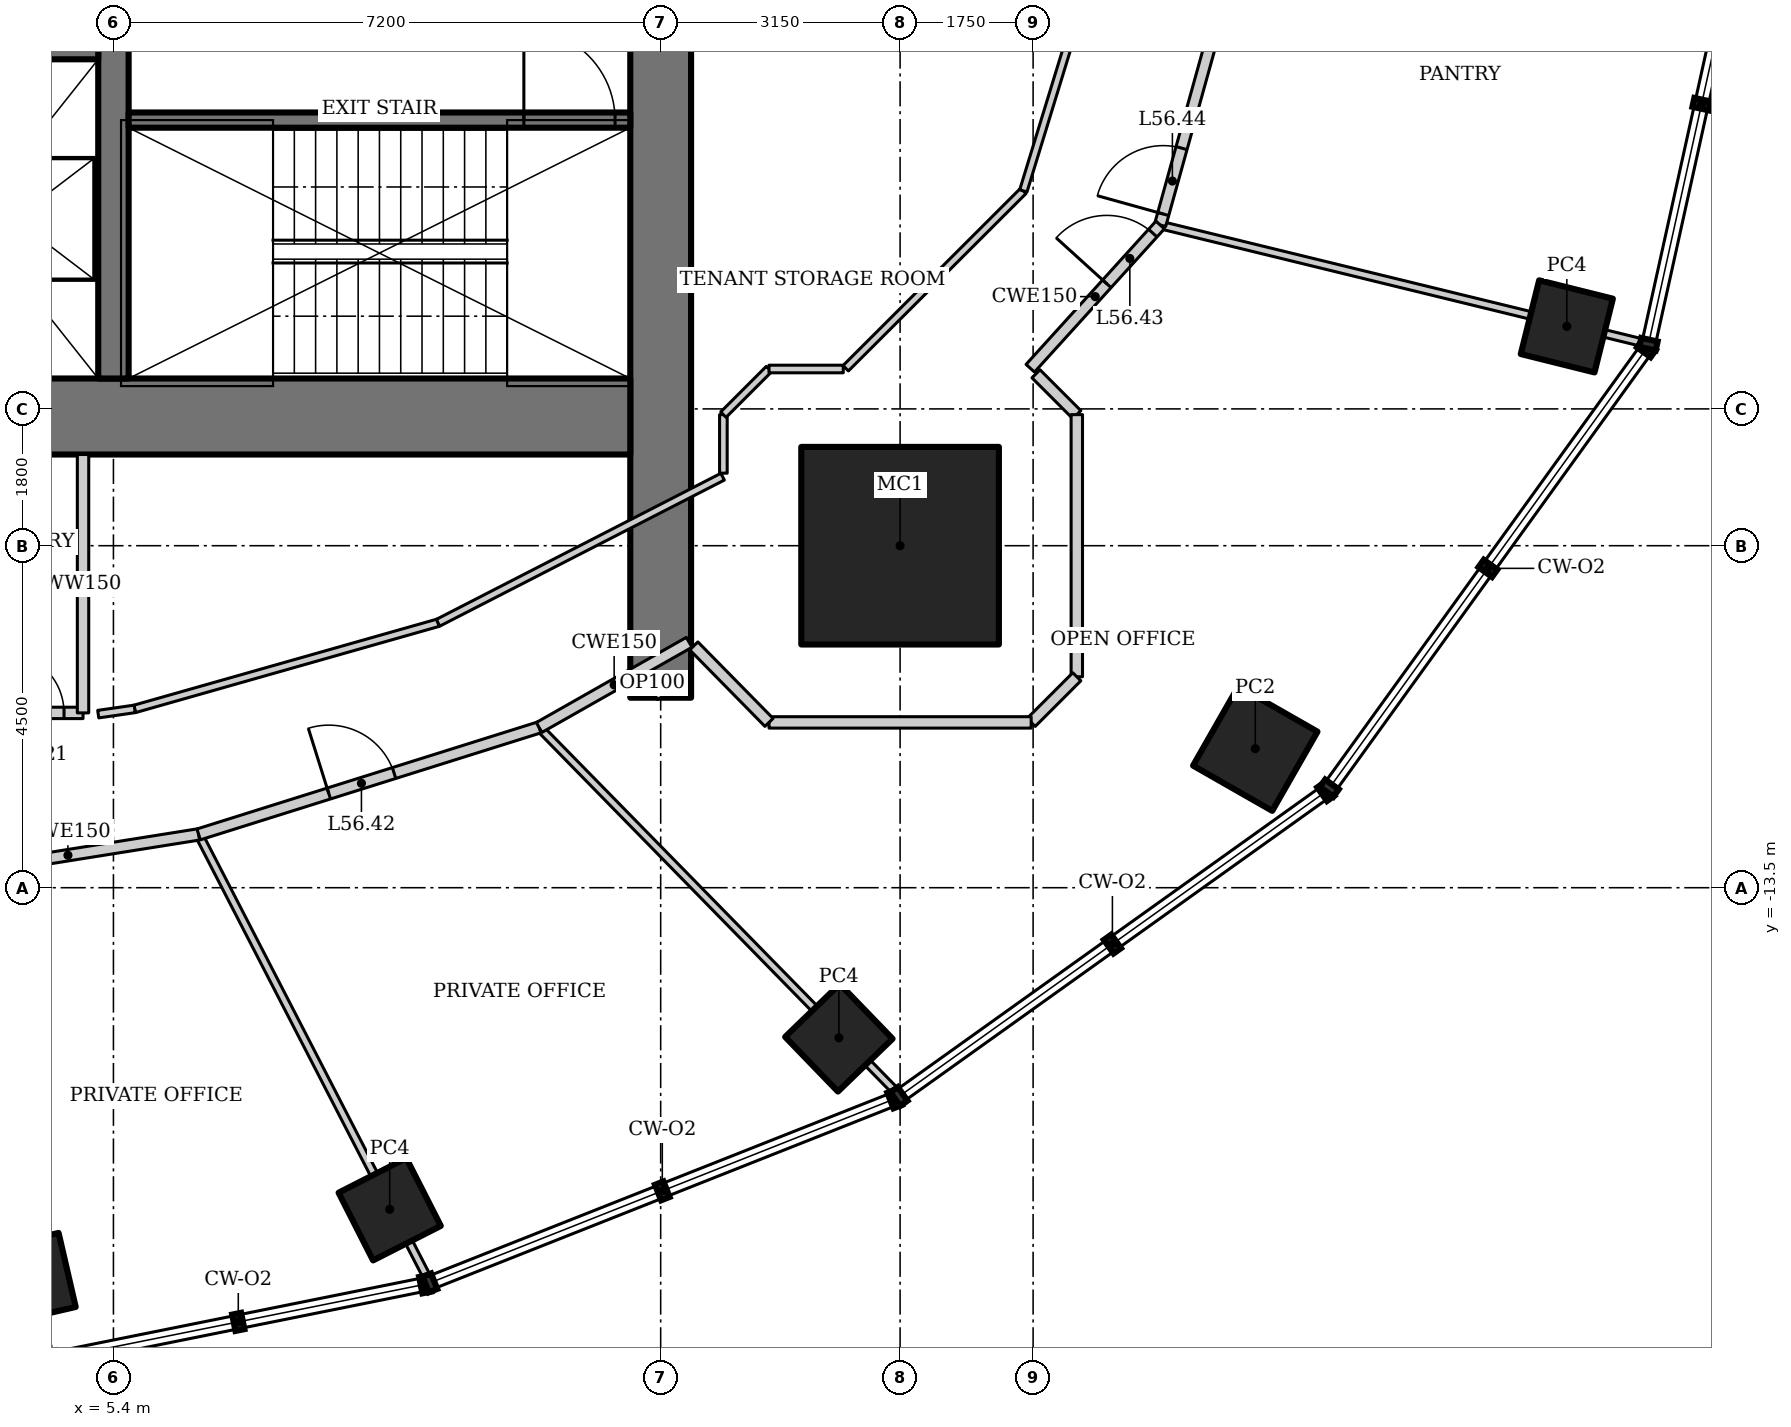
"""IFC4 building model, lengths in metres.
Left out: names, types, materials, properties, quantities, classifications, styles, units other than length and angle.
Written with IfcOpenShell. Run it as: python <this file> out.ifc"""

import sys

from ifc_helpers import new_model, si_unit, direction, frame, frame_2d, origin, origin_2d, place, context, subcontext, project, spatial, rectangle, hollow_rectangle, extrude, element, fill, save


model = new_model("IFC4")
c1 = context("Model", 3, precision=1e-05, world=origin(), true_north=direction((0.0, 1.0)))
c2 = subcontext(c1, "Body", "Model", "MODEL_VIEW")
j1 = project(units=[si_unit("LENGTHUNIT", "METRE"), si_unit("PLANEANGLEUNIT", "RADIAN")], contexts=[c1])
p1 = place(None, origin())
s1 = spatial("IfcSite", under=j1, at=p1, CompositionType="ELEMENT")
p2 = place(p1, origin())
s2 = spatial("IfcBuilding", under=s1, at=p2, CompositionType="ELEMENT")
p3 = place(p2, frame((0.0, 0.0, 241.0)))
s3 = spatial("IfcBuildingStorey", under=s2, at=p3, CompositionType="ELEMENT", Elevation=241.0)
p4 = place(p3, frame((15.75, -9.0, 0.0), z_axis=(0.0, 0.0, 1.0), x_axis=(1.0, 0.0, 0.0)))
e1 = element("IfcColumn", 1, at=p4, inside=s3, PredefinedType="COLUMN", context=c2, shape_type="SweptSolid", body=[
    extrude(hollow_rectangle(XDim=2.6, YDim=2.6, WallThickness=0.13, at=origin_2d()), origin(), (0.0, 0.0, 1.0), 4.2),
])
for number, where, z_axis, x_axis in (
    (2, (4.304, -18.642, 0.0), (0.0, 0.0, 1.0), (0.974, 0.225, 0.0)),
    (3, (9.035, -17.731, 0.0), (0.0, 0.0, 1.0), (0.891, 0.454, 0.0)),
    (4, (14.944, -15.475, 0.0), (0.0, 0.0, 1.0), (0.719, 0.695, 0.0)),
):
    element("IfcColumn", number, at=place(p3, frame(where, z_axis=z_axis, x_axis=x_axis)), inside=s3, PredefinedType="COLUMN", context=c2, shape_type="SweptSolid", body=[
        extrude(hollow_rectangle(XDim=1.0, YDim=1.0, WallThickness=0.08, at=origin_2d()), origin(), (0.0, 0.0, 1.0), 4.2),
    ])
p5 = place(p3, frame((20.423, -11.67, 0.0), z_axis=(0.0, 0.0, 1.0), x_axis=(0.496139221777, 0.86824298017, 0.0)))
e5 = element("IfcColumn", 5, at=p5, inside=s3, PredefinedType="COLUMN", context=c2, shape_type="SweptSolid", body=[
    extrude(hollow_rectangle(XDim=1.2, YDim=1.2, WallThickness=0.1, at=origin_2d()), origin(), (0.0, 0.0, 1.0), 4.2),
])
p6 = place(p3, frame((24.522, -6.114, 0.0), z_axis=(0.0, 0.0, 1.0), x_axis=(0.2419218956, 0.970295726276, 0.0)))
e6 = element("IfcColumn", 6, at=p6, inside=s3, PredefinedType="COLUMN", context=c2, shape_type="SweptSolid", body=[
    extrude(hollow_rectangle(XDim=1.0, YDim=1.0, WallThickness=0.08, at=origin_2d()), origin(), (0.0, 0.0, 1.0), 4.2),
])
p7 = place(p3, frame((12.6, -11.0, 0.0), z_axis=(0.0, 0.0, 1.0), x_axis=(0.0, 1.0, 0.0)))
e7 = element("IfcWall", 7, at=p7, inside=s3, PredefinedType="SHEAR", context=c2, shape_type="SweptSolid", body=[
    extrude(rectangle(XDim=22.0, YDim=0.8, at=frame_2d((11.0, 0.0))), origin(), (0.0, 0.0, 1.0), 4.2),
])
p8 = place(p7, frame((10.1, 0.0, 0.0)))
e8 = element("IfcOpeningElement", 8, at=p8, cuts=e7, PredefinedType="OPENING", context=c2, shape_type="SweptSolid", body=[
    extrude(rectangle(XDim=1.8, YDim=2.1, at=frame_2d((0.9, 1.05))), frame((0.0, 0.41, 0.0), z_axis=(0.0, -1.0, 0.0), x_axis=(1.0, 0.0, 0.0)), (0.0, 0.0, 1.0), 0.82),
])
p9 = place(p3, frame((-12.2, -7.3, 0.0), z_axis=(0.0, 0.0, 1.0), x_axis=(1.0, 0.0, 0.0)))
e9 = element("IfcWall", 9, at=p9, inside=s3, PredefinedType="SHEAR", context=c2, shape_type="SweptSolid", body=[
    extrude(rectangle(XDim=24.4, YDim=1.0, at=frame_2d((12.2, 0.0))), origin(), (0.0, 0.0, 1.0), 4.2),
])
p10 = place(p3, frame((5.4, -6.8, 0.0), z_axis=(0.0, 0.0, 1.0), x_axis=(0.0, 1.0, 0.0)))
e10 = element("IfcWall", 10, at=p10, inside=s3, PredefinedType="SHEAR", context=c2, shape_type="SweptSolid", body=[
    extrude(rectangle(XDim=14.6, YDim=0.4, at=frame_2d((7.3, 0.0))), origin(), (0.0, 0.0, 1.0), 4.2),
])
p11 = place(p10, frame((5.9, 0.0, 0.0)))
e11 = element("IfcOpeningElement", 11, at=p11, cuts=e10, PredefinedType="OPENING", context=c2, shape_type="SweptSolid", body=[
    extrude(rectangle(XDim=1.8, YDim=2.1, at=frame_2d((0.9, 1.05))), frame((0.0, 0.21, 0.0), z_axis=(0.0, -1.0, 0.0), x_axis=(1.0, 0.0, 0.0)), (0.0, 0.0, 1.0), 0.42),
])
p12 = place(p3, frame((-5.2, -2.4, 0.0), z_axis=(0.0, 0.0, 1.0), x_axis=(1.0, 0.0, 0.0)))
e12 = element("IfcWall", 12, at=p12, inside=s3, PredefinedType="SHEAR", context=c2, shape_type="SweptSolid", body=[
    extrude(rectangle(XDim=10.4, YDim=0.4, at=frame_2d((5.2, 0.0))), origin(), (0.0, 0.0, 1.0), 4.2),
])
p13 = place(p12, frame((1.683, 0.0, 0.0)))
e13 = element("IfcOpeningElement", 13, at=p13, cuts=e12, PredefinedType="OPENING", context=c2, shape_type="SweptSolid", body=[
    extrude(rectangle(XDim=1.1, YDim=2.2, at=frame_2d((0.55, 1.1))), frame((0.0, 0.21, 0.0), z_axis=(0.0, -1.0, 0.0), x_axis=(1.0, 0.0, 0.0)), (0.0, 0.0, 1.0), 0.42),
])
p14 = place(p12, frame((5.217, 0.0, 0.0)))
e14 = element("IfcOpeningElement", 14, at=p14, cuts=e12, PredefinedType="OPENING", context=c2, shape_type="SweptSolid", body=[
    extrude(rectangle(XDim=1.1, YDim=2.2, at=frame_2d((0.55, 1.1))), frame((0.0, 0.21, 0.0), z_axis=(0.0, -1.0, 0.0), x_axis=(1.0, 0.0, 0.0)), (0.0, 0.0, 1.0), 0.42),
])
p15 = place(p12, frame((8.75, 0.0, 0.0)))
e15 = element("IfcOpeningElement", 15, at=p15, cuts=e12, PredefinedType="OPENING", context=c2, shape_type="SweptSolid", body=[
    extrude(rectangle(XDim=1.1, YDim=2.2, at=frame_2d((0.55, 1.1))), frame((0.0, 0.21, 0.0), z_axis=(0.0, -1.0, 0.0), x_axis=(1.0, 0.0, 0.0)), (0.0, 0.0, 1.0), 0.42),
])
p16 = place(p3, frame((5.6, -3.4, 0.0), z_axis=(0.0, 0.0, 1.0), x_axis=(1.0, 0.0, 0.0)))
e16 = element("IfcWall", 16, at=p16, inside=s3, PredefinedType="SHEAR", context=c2, shape_type="SweptSolid", body=[
    extrude(rectangle(XDim=6.6, YDim=0.2, at=frame_2d((3.3, 0.0))), origin(), (0.0, 0.0, 1.0), 4.2),
])
p17 = place(p16, frame((5.2, 0.0, 0.0)))
e17 = element("IfcOpeningElement", 17, at=p17, cuts=e16, PredefinedType="OPENING", context=c2, shape_type="SweptSolid", body=[
    extrude(rectangle(XDim=1.2, YDim=2.1, at=frame_2d((0.6, 1.05))), frame((0.0, 0.11, 0.0), z_axis=(0.0, -1.0, 0.0), x_axis=(1.0, 0.0, 0.0)), (0.0, 0.0, 1.0), 0.22),
])
p18 = place(p3, frame((4.556, -19.657, 0.0), z_axis=(0.0, 0.0, 1.0), x_axis=(-0.227524978141, 0.973772244584, 0.0)))
e18 = element("IfcWall", 18, at=p18, inside=s3, PredefinedType="PARTITIONING", context=c2, shape_type="SweptSolid", body=[
    extrude(rectangle(XDim=6.48, YDim=0.1, at=frame_2d((3.24, 0.0))), origin(), (0.0, 0.0, 1.0), 3.293),
])
p19 = place(p3, frame((9.54, -18.65, 0.0), z_axis=(0.0, 0.0, 1.0), x_axis=(-0.458420942987, 0.888735190611, 0.0)))
e19 = element("IfcWall", 19, at=p19, inside=s3, PredefinedType="PARTITIONING", context=c2, shape_type="SweptSolid", body=[
    extrude(rectangle(XDim=6.584, YDim=0.1, at=frame_2d((3.292, 0.0))), origin(), (0.0, 0.0, 1.0), 3.293),
])
p20 = place(p3, frame((15.709, -16.199, 0.0), z_axis=(0.0, 0.0, 1.0), x_axis=(-0.699758297028, 0.71437967898, 0.0)))
e20 = element("IfcWall", 20, at=p20, inside=s3, PredefinedType="PARTITIONING", context=c2, shape_type="SweptSolid", body=[
    extrude(rectangle(XDim=6.729, YDim=0.1, at=frame_2d((3.365, 0.0))), origin(), (0.0, 0.0, 1.0), 3.41),
])
p21 = place(p3, frame((25.543, -6.335, 0.0), z_axis=(0.0, 0.0, 1.0), x_axis=(-0.971467850621, 0.237171278215, 0.0)))
e21 = element("IfcWall", 21, at=p21, inside=s3, PredefinedType="PARTITIONING", context=c2, shape_type="SweptSolid", body=[
    extrude(rectangle(XDim=6.558, YDim=0.1, at=frame_2d((3.279, 0.0))), origin(), (0.0, 0.0, 1.0), 3.108),
])
p22 = place(p3, frame((3.081, -13.347, 0.0), z_axis=(0.0, 0.0, 1.0), x_axis=(0.987554093087, 0.157279729233, 0.0)))
e22 = element("IfcWall", 22, at=p22, inside=s3, PredefinedType="PARTITIONING", context=c2, shape_type="SweptSolid", body=[
    extrude(rectangle(XDim=3.483, YDim=0.15, at=frame_2d((1.742, 0.0))), origin(), (0.0, 0.0, 1.0), 4.05),
])
p23 = place(p22, frame((0.15, 0.0, 0.0)))
e23 = element("IfcOpeningElement", 23, at=p23, cuts=e22, PredefinedType="OPENING", context=c2, shape_type="SweptSolid", body=[
    extrude(rectangle(XDim=0.9, YDim=2.1, at=frame_2d((0.45, 1.05))), frame((0.0, 0.085, 0.0), z_axis=(0.0, -1.0, 0.0), x_axis=(1.0, 0.0, 0.0)), (0.0, 0.0, 1.0), 0.17),
])
p24 = place(p3, frame((6.521, -12.799, 0.0), z_axis=(0.0, 0.0, 1.0), x_axis=(0.954031103669, 0.299707612903, 0.0)))
e24 = element("IfcWall", 24, at=p24, inside=s3, PredefinedType="PARTITIONING", context=c2, shape_type="SweptSolid", body=[
    extrude(rectangle(XDim=4.695, YDim=0.15, at=frame_2d((2.348, 0.0))), origin(), (0.0, 0.0, 1.0), 4.05),
])
p25 = place(p24, frame((1.795, 0.0, 0.0)))
e25 = element("IfcOpeningElement", 25, at=p25, cuts=e24, PredefinedType="OPENING", context=c2, shape_type="SweptSolid", body=[
    extrude(rectangle(XDim=0.9, YDim=2.1, at=frame_2d((0.45, 1.05))), frame((0.0, 0.085, 0.0), z_axis=(0.0, -1.0, 0.0), x_axis=(1.0, 0.0, 0.0)), (0.0, 0.0, 1.0), 0.17),
])
p26 = place(p3, frame((19.172, -4.78, 0.0), z_axis=(0.0, 0.0, 1.0), x_axis=(0.26770731566, 0.963500281859, 0.0)))
e26 = element("IfcWall", 26, at=p26, inside=s3, PredefinedType="PARTITIONING", context=c2, shape_type="SweptSolid", body=[
    extrude(rectangle(XDim=4.961, YDim=0.15, at=frame_2d((2.48, 0.0))), origin(), (0.0, 0.0, 1.0), 4.05),
])
p27 = place(p26, frame((0.15, 0.0, 0.0)))
e27 = element("IfcOpeningElement", 27, at=p27, cuts=e26, PredefinedType="OPENING", context=c2, shape_type="SweptSolid", body=[
    extrude(rectangle(XDim=0.9, YDim=2.1, at=frame_2d((0.45, 1.05))), frame((0.0, 0.085, 0.0), z_axis=(0.0, -1.0, 0.0), x_axis=(1.0, 0.0, 0.0)), (0.0, 0.0, 1.0), 0.17),
])
p28 = place(p3, frame((-5.0, -11.2, 0.0), z_axis=(0.0, 0.0, 1.0), x_axis=(1.0, 0.0, 0.0)))
e28 = element("IfcWall", 28, at=p28, inside=s3, PredefinedType="SOLIDWALL", context=c2, shape_type="SweptSolid", body=[
    extrude(rectangle(XDim=10.0, YDim=0.15, at=frame_2d((5.0, 0.0))), origin(), (0.0, 0.0, 1.0), 4.05),
])
p29 = place(p28, frame((0.45, 0.0, 0.0)))
e29 = element("IfcOpeningElement", 29, at=p29, cuts=e28, PredefinedType="OPENING", context=c2, shape_type="SweptSolid", body=[
    extrude(rectangle(XDim=1.0, YDim=2.1, at=frame_2d((0.5, 1.05))), frame((0.0, 0.085, 0.0), z_axis=(0.0, -1.0, 0.0), x_axis=(1.0, 0.0, 0.0)), (0.0, 0.0, 1.0), 0.17),
])
p30 = place(p28, frame((3.15, 0.0, 0.0)))
e30 = element("IfcOpeningElement", 30, at=p30, cuts=e28, PredefinedType="OPENING", context=c2, shape_type="SweptSolid", body=[
    extrude(rectangle(XDim=0.9, YDim=2.1, at=frame_2d((0.45, 1.05))), frame((0.0, 0.085, 0.0), z_axis=(0.0, -1.0, 0.0), x_axis=(1.0, 0.0, 0.0)), (0.0, 0.0, 1.0), 0.17),
])
p31 = place(p28, frame((6.55, 0.0, 0.0)))
e31 = element("IfcOpeningElement", 31, at=p31, cuts=e28, PredefinedType="OPENING", context=c2, shape_type="SweptSolid", body=[
    extrude(rectangle(XDim=0.9, YDim=2.1, at=frame_2d((0.45, 1.05))), frame((0.0, 0.085, 0.0), z_axis=(0.0, -1.0, 0.0), x_axis=(1.0, 0.0, 0.0)), (0.0, 0.0, 1.0), 0.17),
])
p32 = place(p28, frame((8.95, 0.0, 0.0)))
e32 = element("IfcOpeningElement", 32, at=p32, cuts=e28, PredefinedType="OPENING", context=c2, shape_type="SweptSolid", body=[
    extrude(rectangle(XDim=0.8, YDim=2.1, at=frame_2d((0.4, 1.05))), frame((0.0, 0.085, 0.0), z_axis=(0.0, -1.0, 0.0), x_axis=(1.0, 0.0, 0.0)), (0.0, 0.0, 1.0), 0.17),
])
p33 = place(p3, frame((5.0, -7.8, 0.0), z_axis=(0.0, 0.0, 1.0), x_axis=(0.0, -1.0, 0.0)))
e33 = element("IfcWall", 33, at=p33, inside=s3, PredefinedType="SOLIDWALL", context=c2, shape_type="SweptSolid", body=[
    extrude(rectangle(XDim=3.4, YDim=0.15, at=frame_2d((1.7, 0.0))), origin(), (0.0, 0.0, 1.0), 4.05),
])
p34 = place(p3, frame((9.67, -10.014, 0.0), z_axis=(0.0, 0.0, 1.0), x_axis=(-0.961973498971, -0.273142796496, 0.0)))
e34 = element("IfcWall", 34, at=p34, inside=s3, PredefinedType="PARTITIONING", context=c2, shape_type="SweptSolid", body=[
    extrude(rectangle(XDim=4.148, YDim=0.1, at=frame_2d((2.074, 0.0))), origin(), (0.0, 0.0, 1.0), 4.05),
])
p35 = place(p3, frame((5.68, -11.147, 0.0), z_axis=(0.0, 0.0, 1.0), x_axis=(-0.989797891768, -0.142478536811, 0.0)))
e35 = element("IfcWall", 35, at=p35, inside=s3, PredefinedType="PARTITIONING", context=c2, shape_type="SweptSolid", body=[
    extrude(rectangle(XDim=0.485, YDim=0.1, at=frame_2d((0.242, 0.0))), origin(), (0.0, 0.0, 1.0), 4.05),
])
p36 = place(p3, frame((12.6, -11.0, 0.0), z_axis=(0.0, 0.0, 1.0), x_axis=(-0.493794495037, 0.869578631678, 0.0)))
e36 = element("IfcWall", 36, at=p36, inside=s3, PredefinedType="PARTITIONING", context=c2, shape_type="SweptSolid", body=[
    extrude(rectangle(XDim=0.449, YDim=0.1, at=frame_2d((0.225, 0.0))), origin(), (0.0, 0.0, 1.0), 4.05),
])
p37 = place(p3, frame((11.001, -11.392, 0.0), z_axis=(0.0, 0.0, 1.0), x_axis=(0.869722107117, 0.493541747366, 0.0)))
e37 = element("IfcWall", 37, at=p37, inside=s3, PredefinedType="PARTITIONING", context=c2, shape_type="SweptSolid", body=[
    extrude(rectangle(XDim=2.27, YDim=0.15, at=frame_2d((1.135, 0.0))), origin(), (0.0, 0.0, 1.0), 4.05),
])
p38 = place(p3, frame((17.463, -6.665, 0.0), z_axis=(0.0, 0.0, 1.0), x_axis=(0.671721890643, 0.74080341632, 0.0)))
e38 = element("IfcWall", 38, at=p38, inside=s3, PredefinedType="PARTITIONING", context=c2, shape_type="SweptSolid", body=[
    extrude(rectangle(XDim=2.544, YDim=0.15, at=frame_2d((1.272, 0.0))), origin(), (0.0, 0.0, 1.0), 4.05),
])
p39 = place(p38, frame((1.5, 0.0, 0.0)))
e39 = element("IfcOpeningElement", 39, at=p39, cuts=e38, PredefinedType="OPENING", context=c2, shape_type="SweptSolid", body=[
    extrude(rectangle(XDim=0.9, YDim=2.1, at=frame_2d((0.45, 1.05))), frame((0.0, 0.085, 0.0), z_axis=(0.0, -1.0, 0.0), x_axis=(1.0, 0.0, 0.0)), (0.0, 0.0, 1.0), 0.17),
])
p40 = place(p3, frame((17.372, -4.331, 0.0), z_axis=(0.0, 0.0, 1.0), x_axis=(-0.707587114823, -0.70662612104, 0.0)))
e40 = element("IfcWall", 40, at=p40, inside=s3, PredefinedType="PARTITIONING", context=c2, shape_type="SweptSolid", body=[
    extrude(rectangle(XDim=3.303, YDim=0.1, at=frame_2d((1.651, 0.0))), origin(), (0.0, 0.0, 1.0), 4.05),
])
p41 = place(p3, frame((13.415, -8.092, 0.0), z_axis=(0.0, 0.0, 1.0), x_axis=(-0.889620520549, -0.45670048108, 0.0)))
e41 = element("IfcWall", 41, at=p41, inside=s3, PredefinedType="PARTITIONING", context=c2, shape_type="SweptSolid", body=[
    extrude(rectangle(XDim=4.209, YDim=0.1, at=frame_2d((2.104, 0.0))), origin(), (0.0, 0.0, 1.0), 4.05),
])
p42 = place(p3, frame((13.425, -8.046, 0.0), z_axis=(0.0, 0.0, 1.0), x_axis=(0.0, 1.0, 0.0)))
e42 = element("IfcWall", 42, at=p42, inside=s3, PredefinedType="PARTITIONING", context=c2, shape_type="SweptSolid", body=[
    extrude(rectangle(XDim=0.77, YDim=0.1, at=frame_2d((0.385, 0.0))), origin(), (0.0, 0.0, 1.0), 4.05),
])
p43 = place(p3, frame((13.425, -7.275, 0.0), z_axis=(0.0, 0.0, 1.0), x_axis=(0.707106781187, 0.707106781187, 0.0)))
e43 = element("IfcWall", 43, at=p43, inside=s3, PredefinedType="PARTITIONING", context=c2, shape_type="SweptSolid", body=[
    extrude(rectangle(XDim=0.849, YDim=0.1, at=frame_2d((0.425, 0.0))), origin(), (0.0, 0.0, 1.0), 4.05),
])
p44 = place(p3, frame((14.025, -6.675, 0.0), z_axis=(0.0, 0.0, 1.0), x_axis=(1.0, 0.0, 0.0)))
e44 = element("IfcWall", 44, at=p44, inside=s3, PredefinedType="PARTITIONING", context=c2, shape_type="SweptSolid", body=[
    extrude(rectangle(XDim=0.977, YDim=0.1, at=frame_2d((0.488, 0.0))), origin(), (0.0, 0.0, 1.0), 4.05),
])
p45 = place(p3, frame((17.538, -6.738, 0.0), z_axis=(0.0, 0.0, 1.0), x_axis=(0.707106781187, -0.707106781187, 0.0)))
e45 = element("IfcWall", 45, at=p45, inside=s3, PredefinedType="PARTITIONING", context=c2, shape_type="SweptSolid", body=[
    extrude(rectangle(XDim=0.76, YDim=0.15, at=frame_2d((0.38, 0.0))), origin(), (0.0, 0.0, 1.0), 4.05),
])
p46 = place(p3, frame((18.075, -7.275, 0.0), z_axis=(0.0, 0.0, 1.0), x_axis=(0.0, -1.0, 0.0)))
e46 = element("IfcWall", 46, at=p46, inside=s3, PredefinedType="PARTITIONING", context=c2, shape_type="SweptSolid", body=[
    extrude(rectangle(XDim=3.449, YDim=0.15, at=frame_2d((1.725, 0.0))), origin(), (0.0, 0.0, 1.0), 3.6),
])
p47 = place(p3, frame((18.075, -10.725, 0.0), z_axis=(0.0, 0.0, 1.0), x_axis=(-0.707106781187, -0.707106781187, 0.0)))
e47 = element("IfcWall", 47, at=p47, inside=s3, PredefinedType="PARTITIONING", context=c2, shape_type="SweptSolid", body=[
    extrude(rectangle(XDim=0.849, YDim=0.15, at=frame_2d((0.425, 0.0))), origin(), (0.0, 0.0, 1.0), 4.05),
])
p48 = place(p3, frame((17.475, -11.325, 0.0), z_axis=(0.0, 0.0, 1.0), x_axis=(-1.0, 0.0, 0.0)))
e48 = element("IfcWall", 48, at=p48, inside=s3, PredefinedType="PARTITIONING", context=c2, shape_type="SweptSolid", body=[
    extrude(rectangle(XDim=3.449, YDim=0.15, at=frame_2d((1.725, 0.0))), origin(), (0.0, 0.0, 1.0), 4.05),
])
p49 = place(p3, frame((14.025, -11.325, 0.0), z_axis=(0.0, 0.0, 1.0), x_axis=(-0.701113567316, 0.713049623606, 0.0)))
e49 = element("IfcWall", 49, at=p49, inside=s3, PredefinedType="PARTITIONING", context=c2, shape_type="SweptSolid", body=[
    extrude(rectangle(XDim=1.411, YDim=0.15, at=frame_2d((0.706, 0.0))), origin(), (0.0, 0.0, 1.0), 4.05),
])
p50 = place(p3, frame((17.984, -2.335, 0.0), z_axis=(0.0, 0.0, 1.0), x_axis=(-0.293231279211, -0.956041535129, 0.0)))
e50 = element("IfcWall", 50, at=p50, inside=s3, PredefinedType="PARTITIONING", context=c2, shape_type="SweptSolid", body=[
    extrude(rectangle(XDim=2.088, YDim=0.1, at=frame_2d((1.044, 0.0))), origin(), (0.0, 0.0, 1.0), 4.05),
])
p51 = place(p17, origin())
e51 = element("IfcDoor", 51, at=p51, inside=s3, OperationType="SINGLE_SWING_RIGHT", PredefinedType="DOOR", context=c2, shape_type="SweptSolid", body=[
    extrude(rectangle(XDim=1.2, YDim=2.1, at=frame_2d((0.6, 1.05))), frame((0.0, 0.025, 0.0), z_axis=(0.0, -1.0, 0.0), x_axis=(1.0, 0.0, 0.0)), (0.0, 0.0, 1.0), 0.05),
])
fill(e17, e51)
p52 = place(p32, origin())
e52 = element("IfcDoor", 52, at=p52, inside=s3, OperationType="SINGLE_SWING_LEFT", PredefinedType="DOOR", context=c2, shape_type="SweptSolid", body=[
    extrude(rectangle(XDim=0.8, YDim=2.1, at=frame_2d((0.4, 1.05))), frame((0.0, 0.025, 0.0), z_axis=(0.0, -1.0, 0.0), x_axis=(1.0, 0.0, 0.0)), (0.0, 0.0, 1.0), 0.05),
])
fill(e32, e52)
p53 = place(p25, origin())
e53 = element("IfcDoor", 53, at=p53, inside=s3, OperationType="SINGLE_SWING_LEFT", PredefinedType="DOOR", context=c2, shape_type="SweptSolid", body=[
    extrude(rectangle(XDim=0.9, YDim=2.1, at=frame_2d((0.45, 1.05))), frame((0.0, 0.025, 0.0), z_axis=(0.0, -1.0, 0.0), x_axis=(1.0, 0.0, 0.0)), (0.0, 0.0, 1.0), 0.05),
])
fill(e25, e53)
p54 = place(p39, origin())
e54 = element("IfcDoor", 54, at=p54, inside=s3, OperationType="SINGLE_SWING_LEFT", PredefinedType="DOOR", context=c2, shape_type="SweptSolid", body=[
    extrude(rectangle(XDim=0.9, YDim=2.1, at=frame_2d((0.45, 1.05))), frame((0.0, 0.025, 0.0), z_axis=(0.0, -1.0, 0.0), x_axis=(1.0, 0.0, 0.0)), (0.0, 0.0, 1.0), 0.05),
])
fill(e39, e54)
p55 = place(p27, origin())
e55 = element("IfcDoor", 55, at=p55, inside=s3, OperationType="SINGLE_SWING_LEFT", PredefinedType="DOOR", context=c2, shape_type="SweptSolid", body=[
    extrude(rectangle(XDim=0.9, YDim=2.1, at=frame_2d((0.45, 1.05))), frame((0.0, 0.025, 0.0), z_axis=(0.0, -1.0, 0.0), x_axis=(1.0, 0.0, 0.0)), (0.0, 0.0, 1.0), 0.05),
])
fill(e27, e55)
save(model, sys.argv[1])
